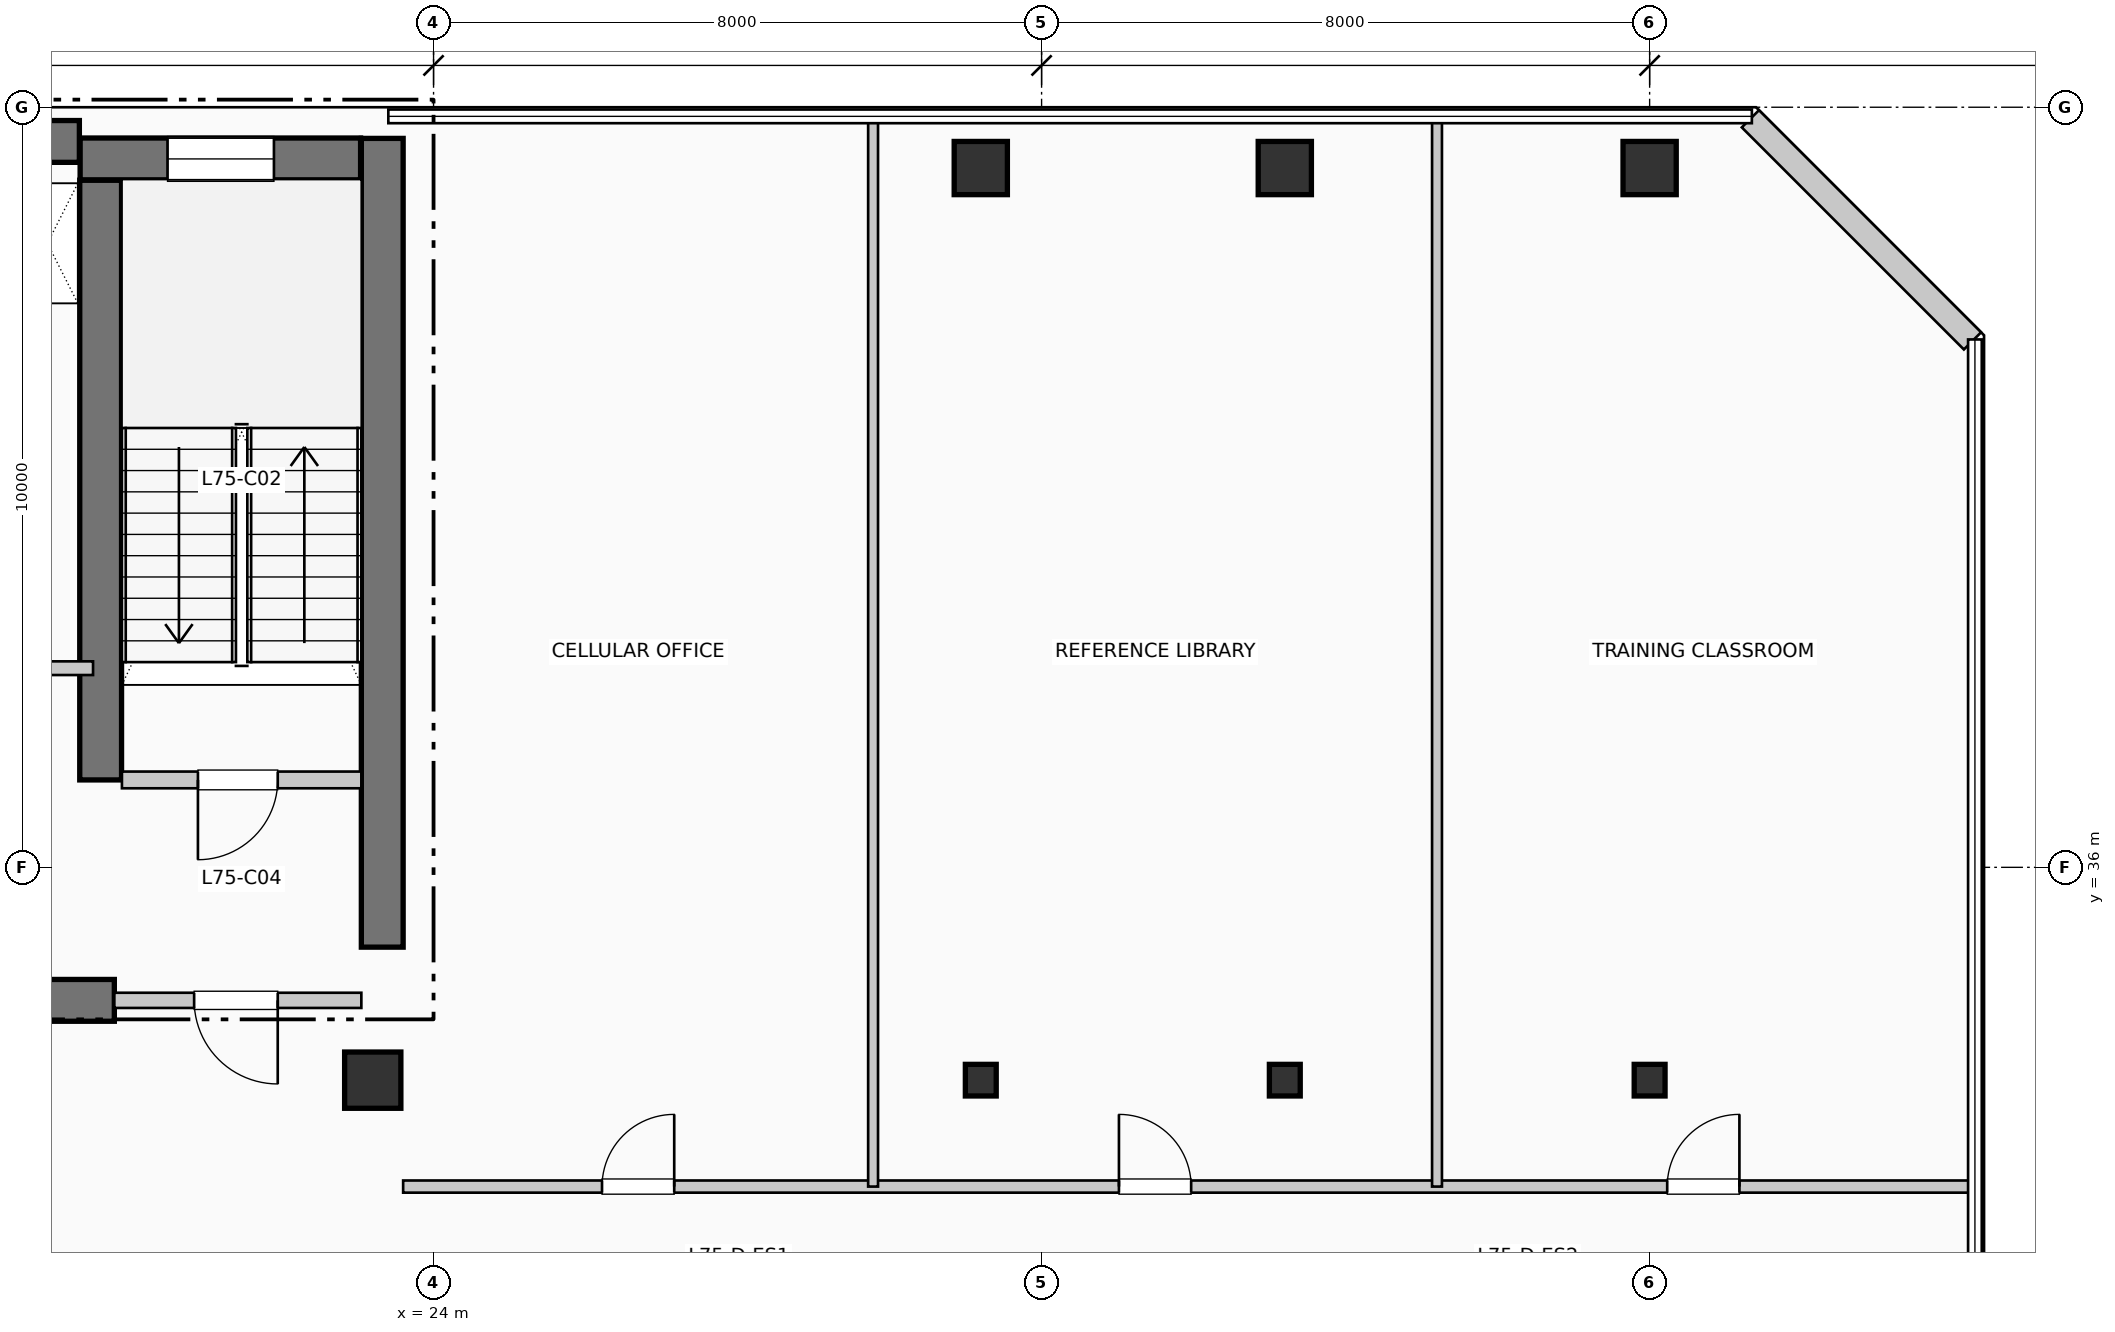
"""IFC4 building model, lengths in metres.
Left out: names, types, materials, properties, quantities, classifications, styles, units other than length and angle.
Written with IfcOpenShell. Run it as: python <this file> out.ifc"""

import sys

from ifc_helpers import new_model, si_unit, direction, frame, frame_2d, origin, origin_2d, place, context, subcontext, project, spatial, rectangle, i_section, extrude, element, fill, save


model = new_model("IFC4")
c1 = context("Model", 3, precision=1e-05, world=origin(), true_north=direction((0.0, 1.0)))
c2 = subcontext(c1, "Body", "Model", "MODEL_VIEW")
j1 = project(units=[si_unit("LENGTHUNIT", "METRE"), si_unit("PLANEANGLEUNIT", "RADIAN")], contexts=[c1])
p1 = place(None, origin())
s1 = spatial("IfcSite", under=j1, at=p1, CompositionType="ELEMENT")
p2 = place(p1, origin())
s2 = spatial("IfcBuilding", under=s1, at=p2, CompositionType="ELEMENT")
p3 = place(p2, frame((0.0, 0.0, 307.89)))
s3 = spatial("IfcBuildingStorey", under=s2, at=p3, CompositionType="ELEMENT", Elevation=307.89)
p4 = place(p3, frame((5.36, 45.55, 0.0), z_axis=(0.0, 0.0, 1.0), x_axis=(1.0, 0.0, 0.0)))
e1 = element("IfcWall", 1, at=p4, inside=s3, PredefinedType="SHEAR", context=c2, shape_type="SweptSolid", body=[
    extrude(rectangle(XDim=13.98, YDim=0.55, at=frame_2d((6.99, 0.0))), origin(), (0.0, 0.0, 1.0), 3.96),
])
p5 = place(p3, frame((23.325, 34.95, 0.0), z_axis=(0.0, 0.0, 1.0), x_axis=(0.0, 1.0, 0.0)))
e2 = element("IfcWall", 2, at=p5, inside=s3, PredefinedType="SHEAR", context=c2, shape_type="SweptSolid", body=[
    extrude(rectangle(XDim=10.64, YDim=0.55, at=frame_2d((5.32, 0.0))), origin(), (0.0, 0.0, 1.0), 3.96),
])
p6 = place(p3, frame((13.68, 34.25, 0.0), z_axis=(0.0, 0.0, 1.0), x_axis=(1.0, 0.0, 0.0)))
e3 = element("IfcWall", 3, at=p6, inside=s3, PredefinedType="SHEAR", context=c2, shape_type="SweptSolid", body=[
    extrude(rectangle(XDim=6.12, YDim=0.55, at=frame_2d((3.06, 0.0))), origin(), (0.0, 0.0, 1.0), 3.96),
])
p7 = place(p3, frame((19.62, 37.15, 0.0), z_axis=(0.0, 0.0, 1.0), x_axis=(0.0, 1.0, 0.0)))
e4 = element("IfcWall", 4, at=p7, inside=s3, PredefinedType="SHEAR", context=c2, shape_type="SweptSolid", body=[
    extrude(rectangle(XDim=7.89, YDim=0.55, at=frame_2d((3.945, 0.0))), origin(), (0.0, 0.0, 1.0), 3.96),
])
p8 = place(p3, frame((19.35, 45.32, 0.0), z_axis=(0.0, 0.0, 1.0), x_axis=(1.0, 0.0, 0.0)))
e5 = element("IfcWall", 5, at=p8, inside=s3, PredefinedType="SHEAR", context=c2, shape_type="SweptSolid", body=[
    extrude(rectangle(XDim=3.69, YDim=0.55, at=frame_2d((1.845, 0.0))), origin(), (0.0, 0.0, 1.0), 3.96),
])
p9 = place(p8, frame((1.15, 0.0, 1.05)))
e6 = element("IfcOpeningElement", 6, at=p9, cuts=e5, PredefinedType="OPENING", context=c2, shape_type="SweptSolid", body=[
    extrude(rectangle(XDim=1.4, YDim=1.8, at=frame_2d((0.7, 0.9))), frame((0.0, 0.285, 0.0), z_axis=(0.0, -1.0, 0.0), x_axis=(1.0, 0.0, 0.0)), (0.0, 0.0, 1.0), 0.57),
])
p10 = place(p3, frame((23.2, 33.2, 0.0), z_axis=(0.0, 0.0, 1.0), x_axis=(1.0, 0.0, 0.0)))
e7 = element("IfcColumn", 7, at=p10, inside=s3, PredefinedType="COLUMN", context=c2, shape_type="SweptSolid", body=[
    extrude(rectangle(XDim=0.74, YDim=0.74, at=origin_2d()), origin(), (0.0, 0.0, 1.0), 3.96),
])
p11 = place(p3, frame((31.2, 33.2, 0.0), z_axis=(0.0, 0.0, 1.0), x_axis=(1.0, 0.0, 0.0)))
e8 = element("IfcColumn", 8, at=p11, inside=s3, PredefinedType="COLUMN", context=c2, shape_type="SweptSolid", body=[
    extrude(i_section(OverallWidth=0.406, OverallDepth=0.416, WebThickness=0.022, FlangeThickness=0.036, at=origin_2d()), origin(), (0.0, 0.0, 1.0), 3.96),
])
p12 = place(p3, frame((31.2, 45.2, 0.0), z_axis=(0.0, 0.0, 1.0), x_axis=(1.0, 0.0, 0.0)))
e9 = element("IfcColumn", 9, at=p12, inside=s3, PredefinedType="COLUMN", context=c2, shape_type="SweptSolid", body=[
    extrude(rectangle(XDim=0.7, YDim=0.7, at=origin_2d()), origin(), (0.0, 0.0, 1.0), 3.96),
])
p13 = place(p3, frame((35.2, 33.2, 0.0), z_axis=(0.0, 0.0, 1.0), x_axis=(1.0, 0.0, 0.0)))
e10 = element("IfcColumn", 10, at=p13, inside=s3, PredefinedType="COLUMN", context=c2, shape_type="SweptSolid", body=[
    extrude(i_section(OverallWidth=0.406, OverallDepth=0.416, WebThickness=0.022, FlangeThickness=0.036, at=origin_2d()), origin(), (0.0, 0.0, 1.0), 3.96),
])
p14 = place(p3, frame((35.2, 45.2, 0.0), z_axis=(0.0, 0.0, 1.0), x_axis=(1.0, 0.0, 0.0)))
e11 = element("IfcColumn", 11, at=p14, inside=s3, PredefinedType="COLUMN", context=c2, shape_type="SweptSolid", body=[
    extrude(rectangle(XDim=0.7, YDim=0.7, at=origin_2d()), origin(), (0.0, 0.0, 1.0), 3.96),
])
p15 = place(p3, frame((40.0, 33.2, 0.0), z_axis=(0.0, 0.0, 1.0), x_axis=(1.0, 0.0, 0.0)))
e12 = element("IfcColumn", 12, at=p15, inside=s3, PredefinedType="COLUMN", context=c2, shape_type="SweptSolid", body=[
    extrude(i_section(OverallWidth=0.406, OverallDepth=0.416, WebThickness=0.022, FlangeThickness=0.036, at=origin_2d()), origin(), (0.0, 0.0, 1.0), 3.96),
])
p16 = place(p3, frame((40.0, 45.2, 0.0), z_axis=(0.0, 0.0, 1.0), x_axis=(1.0, 0.0, 0.0)))
e13 = element("IfcColumn", 13, at=p16, inside=s3, PredefinedType="COLUMN", context=c2, shape_type="SweptSolid", body=[
    extrude(rectangle(XDim=0.7, YDim=0.7, at=origin_2d()), origin(), (0.0, 0.0, 1.0), 3.96),
])
p17 = place(p3, frame((44.248, 42.926, 0.0), z_axis=(0.0, 0.0, 1.0), x_axis=(-0.707136318428, 0.707077242712, 0.0)))
e14 = element("IfcWall", 14, at=p17, inside=s3, PredefinedType="SOLIDWALL", context=c2, shape_type="SweptSolid", body=[
    extrude(rectangle(XDim=4.133, YDim=0.32, at=frame_2d((2.066, 0.0))), origin(), (0.0, 0.0, 1.0), 3.74),
])
p18 = place(p3, frame((19.9, 37.15, 0.0), z_axis=(0.0, 0.0, 1.0), x_axis=(1.0, 0.0, 0.0)))
e15 = element("IfcWall", 15, at=p18, inside=s3, PredefinedType="PARTITIONING", context=c2, shape_type="SweptSolid", body=[
    extrude(rectangle(XDim=3.15, YDim=0.22, at=frame_2d((1.575, 0.0))), origin(), (0.0, 0.0, 1.0), 3.74),
])
p19 = place(p18, frame((2.05, 0.0, 0.0), z_axis=(0.0, 0.0, 1.0), x_axis=(-1.0, 0.0, 0.0)))
e16 = element("IfcOpeningElement", 16, at=p19, cuts=e15, PredefinedType="OPENING", context=c2, shape_type="SweptSolid", body=[
    extrude(rectangle(XDim=1.05, YDim=2.15, at=frame_2d((0.525, 1.075))), frame((0.0, 0.12, 0.0), z_axis=(0.0, -1.0, 0.0), x_axis=(1.0, 0.0, 0.0)), (0.0, 0.0, 1.0), 0.24),
])
p20 = place(p3, frame((19.8, 34.25, 0.0), z_axis=(0.0, 0.0, 1.0), x_axis=(1.0, 0.0, 0.0)))
e17 = element("IfcWall", 17, at=p20, inside=s3, PredefinedType="PARTITIONING", context=c2, shape_type="SweptSolid", body=[
    extrude(rectangle(XDim=3.25, YDim=0.2, at=frame_2d((1.625, 0.0))), origin(), (0.0, 0.0, 1.0), 3.74),
])
p21 = place(p20, frame((2.15, 0.0, 0.0), z_axis=(0.0, 0.0, 1.0), x_axis=(-1.0, 0.0, 0.0)))
e18 = element("IfcOpeningElement", 18, at=p21, cuts=e17, PredefinedType="OPENING", context=c2, shape_type="SweptSolid", body=[
    extrude(rectangle(XDim=1.1, YDim=2.15, at=frame_2d((0.55, 1.075))), frame((0.0, 0.11, 0.0), z_axis=(0.0, -1.0, 0.0), x_axis=(1.0, 0.0, 0.0)), (0.0, 0.0, 1.0), 0.22),
])
p22 = place(p3, frame((17.68, 38.62, 0.0), z_axis=(0.0, 0.0, 1.0), x_axis=(1.0, 0.0, 0.0)))
e19 = element("IfcWall", 19, at=p22, inside=s3, PredefinedType="PARTITIONING", context=c2, shape_type="SweptSolid", body=[
    extrude(rectangle(XDim=1.84, YDim=0.18, at=frame_2d((0.92, 0.0))), origin(), (0.0, 0.0, 1.0), 3.74),
])
p23 = place(p22, frame((0.24, 0.0, 0.0)))
e20 = element("IfcOpeningElement", 20, at=p23, cuts=e19, PredefinedType="OPENING", context=c2, shape_type="SweptSolid", body=[
    extrude(rectangle(XDim=0.92, YDim=2.1, at=frame_2d((0.46, 1.05))), frame((0.0, 0.1, 0.0), z_axis=(0.0, -1.0, 0.0), x_axis=(1.0, 0.0, 0.0)), (0.0, 0.0, 1.0), 0.2),
])
p24 = place(p3, frame((23.6, 31.8, 0.0), z_axis=(0.0, 0.0, 1.0), x_axis=(1.0, 0.0, 0.0)))
e21 = element("IfcWall", 21, at=p24, inside=s3, PredefinedType="PARTITIONING", context=c2, shape_type="SweptSolid", body=[
    extrude(rectangle(XDim=20.61, YDim=0.16, at=frame_2d((10.305, 0.0))), origin(), (0.0, 0.0, 1.0), 3.74),
])
p25 = place(p24, frame((2.616, 0.0, 0.0)))
e22 = element("IfcOpeningElement", 22, at=p25, cuts=e21, PredefinedType="OPENING", context=c2, shape_type="SweptSolid", body=[
    extrude(rectangle(XDim=0.95, YDim=2.15, at=frame_2d((0.475, 1.075))), frame((0.0, 0.09, 0.0), z_axis=(0.0, -1.0, 0.0), x_axis=(1.0, 0.0, 0.0)), (0.0, 0.0, 1.0), 0.18),
])
p26 = place(p24, frame((9.418, 0.0, 0.0)))
e23 = element("IfcOpeningElement", 23, at=p26, cuts=e21, PredefinedType="OPENING", context=c2, shape_type="SweptSolid", body=[
    extrude(rectangle(XDim=0.95, YDim=2.15, at=frame_2d((0.475, 1.075))), frame((0.0, 0.09, 0.0), z_axis=(0.0, -1.0, 0.0), x_axis=(1.0, 0.0, 0.0)), (0.0, 0.0, 1.0), 0.18),
])
p27 = place(p24, frame((16.631, 0.0, 0.0)))
e24 = element("IfcOpeningElement", 24, at=p27, cuts=e21, PredefinedType="OPENING", context=c2, shape_type="SweptSolid", body=[
    extrude(rectangle(XDim=0.95, YDim=2.15, at=frame_2d((0.475, 1.075))), frame((0.0, 0.09, 0.0), z_axis=(0.0, -1.0, 0.0), x_axis=(1.0, 0.0, 0.0)), (0.0, 0.0, 1.0), 0.18),
])
for number, where, z_axis, x_axis in (
    (25, (29.783, 31.8, 0.0), (0.0, 0.0, 1.0), (0.0, 1.0, 0.0)),
    (26, (37.203, 31.8, 0.0), (0.0, 0.0, 1.0), (0.0, 1.0, 0.0)),
):
    element("IfcWall", number, at=place(p3, frame(where, z_axis=z_axis, x_axis=x_axis)), inside=s3, PredefinedType="PARTITIONING", context=c2, shape_type="SweptSolid", body=[
        extrude(rectangle(XDim=14.01, YDim=0.13, at=frame_2d((7.005, 0.0))), origin(), (0.0, 0.0, 1.0), 3.74),
    ])
p28 = place(p9, origin())
e27 = element("IfcWindow", 27, at=p28, inside=s3, PartitioningType="SINGLE_PANEL", PredefinedType="WINDOW", context=c2, shape_type="SweptSolid", body=[
    extrude(rectangle(XDim=1.4, YDim=1.8, at=frame_2d((0.7, 0.9))), frame((0.0, 0.03, 0.0), z_axis=(0.0, -1.0, 0.0), x_axis=(1.0, 0.0, 0.0)), (0.0, 0.0, 1.0), 0.06),
])
fill(e6, e27)
p29 = place(p19, origin())
e28 = element("IfcDoor", 28, at=p29, inside=s3, OperationType="SINGLE_SWING_LEFT", PredefinedType="DOOR", context=c2, shape_type="SweptSolid", body=[
    extrude(rectangle(XDim=1.05, YDim=2.15, at=frame_2d((0.525, 1.075))), frame((0.0, 0.025, 0.0), z_axis=(0.0, -1.0, 0.0), x_axis=(1.0, 0.0, 0.0)), (0.0, 0.0, 1.0), 0.05),
])
fill(e16, e28)
p30 = place(p21, origin())
e29 = element("IfcDoor", 29, at=p30, inside=s3, OperationType="SINGLE_SWING_RIGHT", PredefinedType="DOOR", context=c2, shape_type="SweptSolid", body=[
    extrude(rectangle(XDim=1.1, YDim=2.15, at=frame_2d((0.55, 1.075))), frame((0.0, 0.025, 0.0), z_axis=(0.0, -1.0, 0.0), x_axis=(1.0, 0.0, 0.0)), (0.0, 0.0, 1.0), 0.05),
])
fill(e18, e29)
p31 = place(p25, origin())
e30 = element("IfcDoor", 30, at=p31, inside=s3, OperationType="SINGLE_SWING_RIGHT", PredefinedType="DOOR", context=c2, shape_type="SweptSolid", body=[
    extrude(rectangle(XDim=0.95, YDim=2.15, at=frame_2d((0.475, 1.075))), frame((0.0, 0.025, 0.0), z_axis=(0.0, -1.0, 0.0), x_axis=(1.0, 0.0, 0.0)), (0.0, 0.0, 1.0), 0.05),
])
fill(e22, e30)
p32 = place(p26, origin())
e31 = element("IfcDoor", 31, at=p32, inside=s3, OperationType="SINGLE_SWING_LEFT", PredefinedType="DOOR", context=c2, shape_type="SweptSolid", body=[
    extrude(rectangle(XDim=0.95, YDim=2.15, at=frame_2d((0.475, 1.075))), frame((0.0, 0.025, 0.0), z_axis=(0.0, -1.0, 0.0), x_axis=(1.0, 0.0, 0.0)), (0.0, 0.0, 1.0), 0.05),
])
fill(e23, e31)
p33 = place(p27, origin())
e32 = element("IfcDoor", 32, at=p33, inside=s3, OperationType="SINGLE_SWING_RIGHT", PredefinedType="DOOR", context=c2, shape_type="SweptSolid", body=[
    extrude(rectangle(XDim=0.95, YDim=2.15, at=frame_2d((0.475, 1.075))), frame((0.0, 0.025, 0.0), z_axis=(0.0, -1.0, 0.0), x_axis=(1.0, 0.0, 0.0)), (0.0, 0.0, 1.0), 0.05),
])
fill(e24, e32)
save(model, sys.argv[1])
